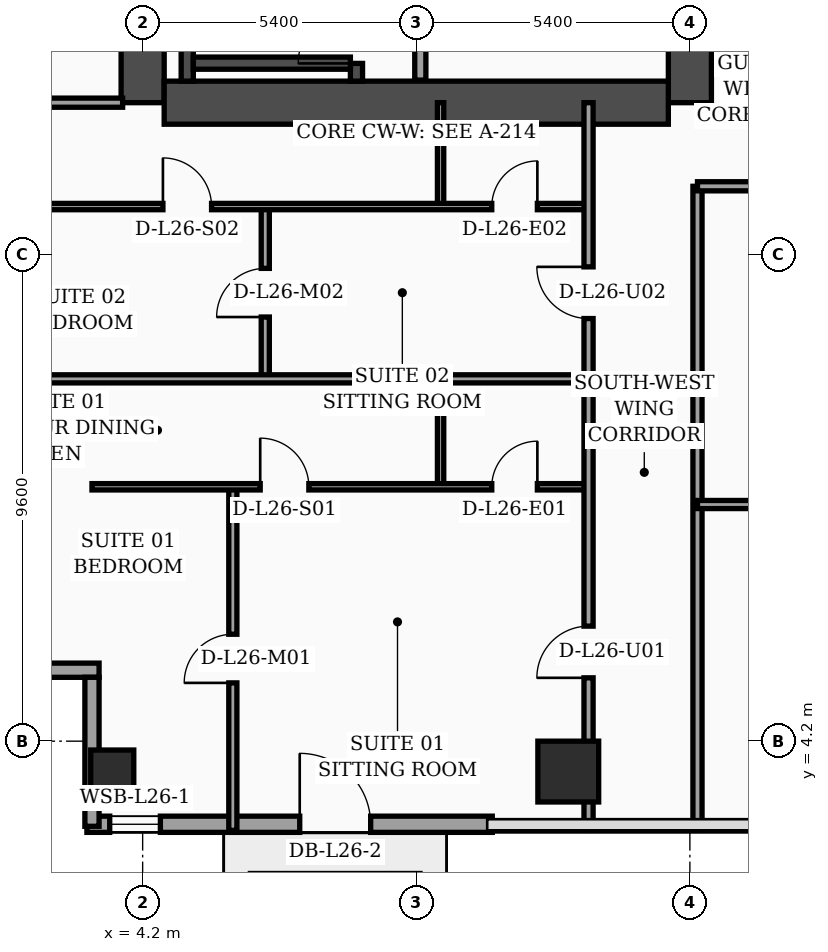
"""IFC4 building model, lengths in metres.
Left out: names, types, materials, properties, quantities, classifications, styles, units other than length and angle.
Written with IfcOpenShell. Run it as: python <this file> out.ifc"""

import sys

from ifc_helpers import new_model, si_unit, direction, frame, frame_2d, origin, origin_2d, place, context, subcontext, project, spatial, rectangle, hollow_rectangle, extrude, element, fill, save


model = new_model("IFC4")
c1 = context("Model", 3, precision=1e-05, world=origin(), true_north=direction((0.0, 1.0)))
c2 = subcontext(c1, "Body", "Model", "MODEL_VIEW")
j1 = project(units=[si_unit("LENGTHUNIT", "METRE"), si_unit("PLANEANGLEUNIT", "RADIAN")], contexts=[c1])
p1 = place(None, origin())
s1 = spatial("IfcSite", under=j1, at=p1, CompositionType="ELEMENT")
p2 = place(p1, origin())
s2 = spatial("IfcBuilding", under=s1, at=p2, CompositionType="ELEMENT")
p3 = place(p2, frame((0.0, 0.0, 108.8)))
s3 = spatial("IfcBuildingStorey", under=s2, at=p3, CompositionType="ELEMENT", Elevation=108.8)
p4 = place(p3, frame((4.2, 16.8, 0.0), z_axis=(0.0, 0.0, 1.0), x_axis=(0.0, 1.0, 0.0)))
e1 = element("IfcWall", 1, at=p4, inside=s3, PredefinedType="SHEAR", context=c2, shape_type="SweptSolid", body=[
    extrude(rectangle(XDim=21.6, YDim=0.85, at=frame_2d((10.8, 0.0))), origin(), (0.0, 0.0, 1.0), 3.56),
])
p5 = place(p3, frame((15.0, 16.8, 0.0), z_axis=(0.0, 0.0, 1.0), x_axis=(0.0, 1.0, 0.0)))
e2 = element("IfcWall", 2, at=p5, inside=s3, PredefinedType="SHEAR", context=c2, shape_type="SweptSolid", body=[
    extrude(rectangle(XDim=21.6, YDim=0.85, at=frame_2d((10.8, 0.0))), origin(), (0.0, 0.0, 1.0), 3.56),
])
p6 = place(p5, frame((8.65, 0.0, 0.0)))
e3 = element("IfcOpeningElement", 3, at=p6, cuts=e2, PredefinedType="OPENING", context=c2, shape_type="SweptSolid", body=[
    extrude(rectangle(XDim=1.1, YDim=2.2, at=frame_2d((0.55, 1.1))), frame((0.0, 0.435, 0.0), z_axis=(0.0, -1.0, 0.0), x_axis=(1.0, 0.0, 0.0)), (0.0, 0.0, 1.0), 0.87),
])
p7 = place(p5, frame((10.85, 0.0, 0.0)))
e4 = element("IfcOpeningElement", 4, at=p7, cuts=e2, PredefinedType="OPENING", context=c2, shape_type="SweptSolid", body=[
    extrude(rectangle(XDim=1.1, YDim=2.2, at=frame_2d((0.55, 1.1))), frame((0.0, 0.435, 0.0), z_axis=(0.0, -1.0, 0.0), x_axis=(1.0, 0.0, 0.0)), (0.0, 0.0, 1.0), 0.87),
])
p8 = place(p5, frame((13.5, 0.0, 0.0)))
e5 = element("IfcOpeningElement", 5, at=p8, cuts=e2, PredefinedType="OPENING", context=c2, shape_type="SweptSolid", body=[
    extrude(rectangle(XDim=1.1, YDim=2.2, at=frame_2d((0.55, 1.1))), frame((0.0, 0.435, 0.0), z_axis=(0.0, -1.0, 0.0), x_axis=(1.0, 0.0, 0.0)), (0.0, 0.0, 1.0), 0.87),
])
p9 = place(p5, frame((16.15, 0.0, 0.0)))
e6 = element("IfcOpeningElement", 6, at=p9, cuts=e2, PredefinedType="OPENING", context=c2, shape_type="SweptSolid", body=[
    extrude(rectangle(XDim=1.1, YDim=2.2, at=frame_2d((0.55, 1.1))), frame((0.0, 0.435, 0.0), z_axis=(0.0, -1.0, 0.0), x_axis=(1.0, 0.0, 0.0)), (0.0, 0.0, 1.0), 0.87),
])
p10 = place(p3, frame((4.625, 16.8, 0.0), z_axis=(0.0, 0.0, 1.0), x_axis=(1.0, 0.0, 0.0)))
e7 = element("IfcWall", 7, at=p10, inside=s3, PredefinedType="SHEAR", context=c2, shape_type="SweptSolid", body=[
    extrude(rectangle(XDim=9.95, YDim=0.85, at=frame_2d((4.975, 0.0))), origin(), (0.0, 0.0, 1.0), 3.56),
])
p11 = place(p3, frame((5.08, 17.225, 0.0), z_axis=(0.0, 0.0, 1.0), x_axis=(0.0, 1.0, 0.0)))
e8 = element("IfcWall", 8, at=p11, inside=s3, PredefinedType="SOLIDWALL", context=c2, shape_type="SweptSolid", body=[
    extrude(rectangle(XDim=9.565, YDim=0.24, at=frame_2d((4.782, 0.0))), origin(), (0.0, 0.0, 1.0), 3.56),
])
p12 = place(p3, frame((8.42, 17.225, 0.0), z_axis=(0.0, 0.0, 1.0), x_axis=(0.0, 1.0, 0.0)))
e9 = element("IfcWall", 9, at=p12, inside=s3, PredefinedType="SOLIDWALL", context=c2, shape_type="SweptSolid", body=[
    extrude(rectangle(XDim=9.565, YDim=0.24, at=frame_2d((4.782, 0.0))), origin(), (0.0, 0.0, 1.0), 3.56),
])
p13 = place(p12, frame((0.35, 0.0, 0.0)))
e10 = element("IfcOpeningElement", 10, at=p13, cuts=e9, PredefinedType="OPENING", context=c2, shape_type="SweptSolid", body=[
    extrude(rectangle(XDim=1.15, YDim=2.2, at=frame_2d((0.575, 1.1))), frame((0.0, 0.13, 0.0), z_axis=(0.0, -1.0, 0.0), x_axis=(1.0, 0.0, 0.0)), (0.0, 0.0, 1.0), 0.26),
])
p14 = place(p3, frame((5.2, 17.58, 0.0), z_axis=(0.0, 0.0, 1.0), x_axis=(1.0, 0.0, 0.0)))
e11 = element("IfcWall", 11, at=p14, inside=s3, PredefinedType="SOLIDWALL", context=c2, shape_type="SweptSolid", body=[
    extrude(rectangle(XDim=3.1, YDim=0.24, at=frame_2d((1.55, 0.0))), origin(), (0.0, 0.0, 1.0), 3.56),
])
p15 = place(p3, frame((3.6, 3.6, 0.0), z_axis=(0.0, 0.0, 1.0), x_axis=(1.0, 0.0, 0.0)))
e12 = element("IfcColumn", 12, at=p15, inside=s3, PredefinedType="COLUMN", context=c2, shape_type="SweptSolid", body=[
    extrude(hollow_rectangle(XDim=0.85, YDim=0.85, WallThickness=0.036, at=origin_2d()), origin(), (0.0, 0.0, 1.0), 3.56),
])
p16 = place(p3, frame((12.6, 3.6, 0.0), z_axis=(0.0, 0.0, 1.0), x_axis=(1.0, 0.0, 0.0)))
e13 = element("IfcColumn", 13, at=p16, inside=s3, PredefinedType="COLUMN", context=c2, shape_type="SweptSolid", body=[
    extrude(rectangle(XDim=1.2, YDim=1.2, at=origin_2d()), origin(), (0.0, 0.0, 1.0), 3.56),
])
p17 = place(p3, frame((3.1, 2.56, 0.0), z_axis=(0.0, 0.0, 1.0), x_axis=(1.0, 0.0, 0.0)))
e14 = element("IfcWall", 14, at=p17, inside=s3, PredefinedType="SOLIDWALL", context=c2, shape_type="SweptSolid", body=[
    extrude(rectangle(XDim=8.0, YDim=0.32, at=frame_2d((4.0, 0.0))), origin(), (0.0, 0.0, 1.0), 3.56),
])
p18 = place(p17, frame((0.45, 0.0, 0.75)))
e15 = element("IfcOpeningElement", 15, at=p18, cuts=e14, PredefinedType="OPENING", context=c2, shape_type="SweptSolid", body=[
    extrude(rectangle(XDim=1.0, YDim=1.6, at=frame_2d((0.5, 0.8))), frame((0.0, 0.17, 0.0), z_axis=(0.0, -1.0, 0.0), x_axis=(1.0, 0.0, 0.0)), (0.0, 0.0, 1.0), 0.34),
])
p19 = place(p17, frame((4.2, 0.0, 0.0)))
e16 = element("IfcOpeningElement", 16, at=p19, cuts=e14, PredefinedType="OPENING", context=c2, shape_type="SweptSolid", body=[
    extrude(rectangle(XDim=1.4, YDim=2.25, at=frame_2d((0.7, 1.125))), frame((0.0, 0.17, 0.0), z_axis=(0.0, -1.0, 0.0), x_axis=(1.0, 0.0, 0.0)), (0.0, 0.0, 1.0), 0.34),
])
p20 = place(p3, frame((0.12, 5.6, 0.0), z_axis=(0.0, 0.0, 1.0), x_axis=(1.0, 0.0, 0.0)))
e17 = element("IfcWall", 17, at=p20, inside=s3, PredefinedType="SOLIDWALL", context=c2, shape_type="SweptSolid", body=[
    extrude(rectangle(XDim=3.22, YDim=0.28, at=frame_2d((1.61, 0.0))), origin(), (0.0, 0.0, 1.0), 2.84),
])
p21 = place(p3, frame((3.2, 5.46, 0.0), z_axis=(0.0, 0.0, 1.0), x_axis=(0.0, -1.0, 0.0)))
e18 = element("IfcWall", 18, at=p21, inside=s3, PredefinedType="SOLIDWALL", context=c2, shape_type="SweptSolid", body=[
    extrude(rectangle(XDim=2.94, YDim=0.28, at=frame_2d((1.47, 0.0))), origin(), (0.0, 0.0, 1.0), 2.84),
])
p22 = place(p3, frame((9.68, 17.245, 0.0), z_axis=(0.0, 0.0, 1.0), x_axis=(0.0, 1.0, 0.0)))
e19 = element("IfcWall", 19, at=p22, inside=s3, PredefinedType="SOLIDWALL", context=c2, shape_type="SweptSolid", body=[
    extrude(rectangle(XDim=7.755, YDim=0.22, at=frame_2d((3.877, 0.0))), origin(), (0.0, 0.0, 1.0), 3.56),
])
p23 = place(p3, frame((0.08, 16.8, 0.0), z_axis=(0.0, 0.0, 1.0), x_axis=(1.0, 0.0, 0.0)))
e20 = element("IfcWall", 20, at=p23, inside=s3, PredefinedType="PARTITIONING", context=c2, shape_type="SweptSolid", body=[
    extrude(rectangle(XDim=3.725, YDim=0.18, at=frame_2d((1.862, 0.0))), origin(), (0.0, 0.0, 1.0), 2.84),
])
p24 = place(p3, frame((10.08, 9.22, 0.0), z_axis=(0.0, 0.0, 1.0), x_axis=(0.0, 1.0, 0.0)))
e21 = element("IfcWall", 21, at=p24, inside=s3, PredefinedType="PARTITIONING", context=c2, shape_type="SweptSolid", body=[
    extrude(rectangle(XDim=2.13, YDim=0.125, at=frame_2d((1.065, 0.0))), origin(), (0.0, 0.0, 1.0), 3.09),
])
p25 = place(p3, frame((5.98, 2.44, 0.0), z_axis=(0.0, 0.0, 1.0), x_axis=(0.0, 1.0, 0.0)))
e22 = element("IfcWall", 22, at=p25, inside=s3, PredefinedType="PARTITIONING", context=c2, shape_type="SweptSolid", body=[
    extrude(rectangle(XDim=6.78, YDim=0.16, at=frame_2d((3.39, 0.0))), origin(), (0.0, 0.0, 1.0), 3.04),
])
p26 = place(p25, frame((2.91, 0.0, 0.0)))
e23 = element("IfcOpeningElement", 23, at=p26, cuts=e22, PredefinedType="OPENING", context=c2, shape_type="SweptSolid", body=[
    extrude(rectangle(XDim=0.96, YDim=2.2, at=frame_2d((0.48, 1.1))), frame((0.0, 0.09, 0.0), z_axis=(0.0, -1.0, 0.0), x_axis=(1.0, 0.0, 0.0)), (0.0, 0.0, 1.0), 0.18),
])
p27 = place(p3, frame((3.2, 9.22, 0.0), z_axis=(0.0, 0.0, 1.0), x_axis=(1.0, 0.0, 0.0)))
e24 = element("IfcWall", 24, at=p27, inside=s3, PredefinedType="PARTITIONING", context=c2, shape_type="SweptSolid", body=[
    extrude(rectangle(XDim=9.8, YDim=0.125, at=frame_2d((4.9, 0.0))), origin(), (0.0, 0.0, 1.0), 2.84),
])
p28 = place(p27, frame((3.32, 0.0, 0.0)))
e25 = element("IfcOpeningElement", 25, at=p28, cuts=e24, PredefinedType="OPENING", context=c2, shape_type="SweptSolid", body=[
    extrude(rectangle(XDim=0.96, YDim=2.2, at=frame_2d((0.48, 1.1))), frame((0.0, 0.073, 0.0), z_axis=(0.0, -1.0, 0.0), x_axis=(1.0, 0.0, 0.0)), (0.0, 0.0, 1.0), 0.145),
])
p29 = place(p27, frame((7.89, 0.0, 0.0)))
e26 = element("IfcOpeningElement", 26, at=p29, cuts=e24, PredefinedType="OPENING", context=c2, shape_type="SweptSolid", body=[
    extrude(rectangle(XDim=0.9, YDim=2.15, at=frame_2d((0.45, 1.075))), frame((0.0, 0.073, 0.0), z_axis=(0.0, -1.0, 0.0), x_axis=(1.0, 0.0, 0.0)), (0.0, 0.0, 1.0), 0.145),
])
p30 = place(p3, frame((10.08, 14.75, 0.0), z_axis=(0.0, 0.0, 1.0), x_axis=(0.0, 1.0, 0.0)))
e27 = element("IfcWall", 27, at=p30, inside=s3, PredefinedType="PARTITIONING", context=c2, shape_type="SweptSolid", body=[
    extrude(rectangle(XDim=2.05, YDim=0.125, at=frame_2d((1.025, 0.0))), origin(), (0.0, 0.0, 1.0), 3.56),
])
p31 = place(p3, frame((6.62, 11.35, 0.0), z_axis=(0.0, 0.0, 1.0), x_axis=(0.0, 1.0, 0.0)))
e28 = element("IfcWall", 28, at=p31, inside=s3, PredefinedType="PARTITIONING", context=c2, shape_type="SweptSolid", body=[
    extrude(rectangle(XDim=3.4, YDim=0.16, at=frame_2d((1.7, 0.0))), origin(), (0.0, 0.0, 1.0), 3.56),
])
p32 = place(p31, frame((1.22, 0.0, 0.0)))
e29 = element("IfcOpeningElement", 29, at=p32, cuts=e28, PredefinedType="OPENING", context=c2, shape_type="SweptSolid", body=[
    extrude(rectangle(XDim=0.96, YDim=2.2, at=frame_2d((0.48, 1.1))), frame((0.0, 0.09, 0.0), z_axis=(0.0, -1.0, 0.0), x_axis=(1.0, 0.0, 0.0)), (0.0, 0.0, 1.0), 0.18),
])
p33 = place(p3, frame((0.08, 14.75, 0.0), z_axis=(0.0, 0.0, 1.0), x_axis=(1.0, 0.0, 0.0)))
e30 = element("IfcWall", 30, at=p33, inside=s3, PredefinedType="PARTITIONING", context=c2, shape_type="SweptSolid", body=[
    extrude(rectangle(XDim=12.92, YDim=0.125, at=frame_2d((6.46, 0.0))), origin(), (0.0, 0.0, 1.0), 2.84),
])
p34 = place(p33, frame((4.52, 0.0, 0.0)))
e31 = element("IfcOpeningElement", 31, at=p34, cuts=e30, PredefinedType="OPENING", context=c2, shape_type="SweptSolid", body=[
    extrude(rectangle(XDim=0.96, YDim=2.2, at=frame_2d((0.48, 1.1))), frame((0.0, 0.073, 0.0), z_axis=(0.0, -1.0, 0.0), x_axis=(1.0, 0.0, 0.0)), (0.0, 0.0, 1.0), 0.145),
])
p35 = place(p33, frame((11.01, 0.0, 0.0)))
e32 = element("IfcOpeningElement", 32, at=p35, cuts=e30, PredefinedType="OPENING", context=c2, shape_type="SweptSolid", body=[
    extrude(rectangle(XDim=0.9, YDim=2.15, at=frame_2d((0.45, 1.075))), frame((0.0, 0.073, 0.0), z_axis=(0.0, -1.0, 0.0), x_axis=(1.0, 0.0, 0.0)), (0.0, 0.0, 1.0), 0.145),
])
p36 = place(p3, frame((0.08, 11.35, 0.0), z_axis=(0.0, 0.0, 1.0), x_axis=(1.0, 0.0, 0.0)))
e33 = element("IfcWall", 33, at=p36, inside=s3, PredefinedType="PARTITIONING", context=c2, shape_type="SweptSolid", body=[
    extrude(rectangle(XDim=12.92, YDim=0.16, at=frame_2d((6.46, 0.0))), origin(), (0.0, 0.0, 1.0), 2.84),
])
p37 = place(p3, frame((13.0, 2.44, 0.0), z_axis=(0.0, 0.0, 1.0), x_axis=(0.0, 1.0, 0.0)))
e34 = element("IfcWall", 34, at=p37, inside=s3, PredefinedType="PARTITIONING", context=c2, shape_type="SweptSolid", body=[
    extrude(rectangle(XDim=14.36, YDim=0.18, at=frame_2d((7.18, 0.0))), origin(), (0.0, 0.0, 1.0), 2.84),
])
p38 = place(p37, frame((3.01, 0.0, 0.0)))
e35 = element("IfcOpeningElement", 35, at=p38, cuts=e34, PredefinedType="OPENING", context=c2, shape_type="SweptSolid", body=[
    extrude(rectangle(XDim=1.02, YDim=2.2, at=frame_2d((0.51, 1.1))), frame((0.0, 0.1, 0.0), z_axis=(0.0, -1.0, 0.0), x_axis=(1.0, 0.0, 0.0)), (0.0, 0.0, 1.0), 0.2),
])
p39 = place(p37, frame((10.1, 0.0, 0.0)))
e36 = element("IfcOpeningElement", 36, at=p39, cuts=e34, PredefinedType="OPENING", context=c2, shape_type="SweptSolid", body=[
    extrude(rectangle(XDim=1.02, YDim=2.2, at=frame_2d((0.51, 1.1))), frame((0.0, 0.1, 0.0), z_axis=(0.0, -1.0, 0.0), x_axis=(1.0, 0.0, 0.0)), (0.0, 0.0, 1.0), 0.2),
])
p40 = place(p3, frame((15.15, 2.44, 0.0), z_axis=(0.0, 0.0, 1.0), x_axis=(0.0, 1.0, 0.0)))
e37 = element("IfcWall", 37, at=p40, inside=s3, PredefinedType="PARTITIONING", context=c2, shape_type="SweptSolid", body=[
    extrude(rectangle(XDim=12.71, YDim=0.18, at=frame_2d((6.355, 0.0))), origin(), (0.0, 0.0, 1.0), 3.04),
])
p41 = place(p3, frame((15.15, 8.87, 0.0), z_axis=(0.0, 0.0, 1.0), x_axis=(1.0, 0.0, 0.0)))
e38 = element("IfcWall", 38, at=p41, inside=s3, PredefinedType="PARTITIONING", context=c2, shape_type="SweptSolid", body=[
    extrude(rectangle(XDim=4.45, YDim=0.16, at=frame_2d((2.225, 0.0))), origin(), (0.0, 0.0, 1.0), 3.56),
])
p42 = place(p41, frame((1.75, 0.0, 0.0)))
e39 = element("IfcOpeningElement", 39, at=p42, cuts=e38, PredefinedType="OPENING", context=c2, shape_type="SweptSolid", body=[
    extrude(rectangle(XDim=0.96, YDim=2.2, at=frame_2d((0.48, 1.1))), frame((0.0, 0.09, 0.0), z_axis=(0.0, -1.0, 0.0), x_axis=(1.0, 0.0, 0.0)), (0.0, 0.0, 1.0), 0.18),
])
p43 = place(p3, frame((15.15, 15.15, 0.0), z_axis=(0.0, 0.0, 1.0), x_axis=(1.0, 0.0, 0.0)))
e40 = element("IfcWall", 40, at=p43, inside=s3, PredefinedType="PARTITIONING", context=c2, shape_type="SweptSolid", body=[
    extrude(rectangle(XDim=6.45, YDim=0.18, at=frame_2d((3.225, 0.0))), origin(), (0.0, 0.0, 1.0), 2.49),
])
p44 = place(p43, frame((1.74, 0.0, 0.0)))
e41 = element("IfcOpeningElement", 41, at=p44, cuts=e40, PredefinedType="OPENING", context=c2, shape_type="SweptSolid", body=[
    extrude(rectangle(XDim=1.02, YDim=2.2, at=frame_2d((0.51, 1.1))), frame((0.0, 0.1, 0.0), z_axis=(0.0, -1.0, 0.0), x_axis=(1.0, 0.0, 0.0)), (0.0, 0.0, 1.0), 0.2),
])
p45 = place(p18, origin())
e42 = element("IfcWindow", 42, at=p45, inside=s3, PartitioningType="SINGLE_PANEL", PredefinedType="WINDOW", context=c2, shape_type="SweptSolid", body=[
    extrude(rectangle(XDim=1.0, YDim=1.6, at=frame_2d((0.5, 0.8))), frame((0.0, 0.03, 0.0), z_axis=(0.0, -1.0, 0.0), x_axis=(1.0, 0.0, 0.0)), (0.0, 0.0, 1.0), 0.06),
])
fill(e15, e42)
p46 = place(p19, origin())
e43 = element("IfcDoor", 43, at=p46, inside=s3, OperationType="SINGLE_SWING_LEFT", PredefinedType="DOOR", context=c2, shape_type="SweptSolid", body=[
    extrude(rectangle(XDim=1.4, YDim=2.25, at=frame_2d((0.7, 1.125))), frame((0.0, 0.025, 0.0), z_axis=(0.0, -1.0, 0.0), x_axis=(1.0, 0.0, 0.0)), (0.0, 0.0, 1.0), 0.05),
])
fill(e16, e43)
p47 = place(p26, origin())
e44 = element("IfcDoor", 44, at=p47, inside=s3, OperationType="SINGLE_SWING_LEFT", PredefinedType="DOOR", context=c2, shape_type="SweptSolid", body=[
    extrude(rectangle(XDim=0.96, YDim=2.2, at=frame_2d((0.48, 1.1))), frame((0.0, 0.025, 0.0), z_axis=(0.0, -1.0, 0.0), x_axis=(1.0, 0.0, 0.0)), (0.0, 0.0, 1.0), 0.05),
])
fill(e23, e44)
p48 = place(p28, origin())
e45 = element("IfcDoor", 45, at=p48, inside=s3, OperationType="SINGLE_SWING_LEFT", PredefinedType="DOOR", context=c2, shape_type="SweptSolid", body=[
    extrude(rectangle(XDim=0.96, YDim=2.2, at=frame_2d((0.48, 1.1))), frame((0.0, 0.025, 0.0), z_axis=(0.0, -1.0, 0.0), x_axis=(1.0, 0.0, 0.0)), (0.0, 0.0, 1.0), 0.05),
])
fill(e25, e45)
p49 = place(p29, origin())
e46 = element("IfcDoor", 46, at=p49, inside=s3, OperationType="SINGLE_SWING_RIGHT", PredefinedType="DOOR", context=c2, shape_type="SweptSolid", body=[
    extrude(rectangle(XDim=0.9, YDim=2.15, at=frame_2d((0.45, 1.075))), frame((0.0, 0.025, 0.0), z_axis=(0.0, -1.0, 0.0), x_axis=(1.0, 0.0, 0.0)), (0.0, 0.0, 1.0), 0.05),
])
fill(e26, e46)
p50 = place(p32, origin())
e47 = element("IfcDoor", 47, at=p50, inside=s3, OperationType="SINGLE_SWING_LEFT", PredefinedType="DOOR", context=c2, shape_type="SweptSolid", body=[
    extrude(rectangle(XDim=0.96, YDim=2.2, at=frame_2d((0.48, 1.1))), frame((0.0, 0.025, 0.0), z_axis=(0.0, -1.0, 0.0), x_axis=(1.0, 0.0, 0.0)), (0.0, 0.0, 1.0), 0.05),
])
fill(e29, e47)
p51 = place(p34, origin())
e48 = element("IfcDoor", 48, at=p51, inside=s3, OperationType="SINGLE_SWING_LEFT", PredefinedType="DOOR", context=c2, shape_type="SweptSolid", body=[
    extrude(rectangle(XDim=0.96, YDim=2.2, at=frame_2d((0.48, 1.1))), frame((0.0, 0.025, 0.0), z_axis=(0.0, -1.0, 0.0), x_axis=(1.0, 0.0, 0.0)), (0.0, 0.0, 1.0), 0.05),
])
fill(e31, e48)
p52 = place(p35, origin())
e49 = element("IfcDoor", 49, at=p52, inside=s3, OperationType="SINGLE_SWING_RIGHT", PredefinedType="DOOR", context=c2, shape_type="SweptSolid", body=[
    extrude(rectangle(XDim=0.9, YDim=2.15, at=frame_2d((0.45, 1.075))), frame((0.0, 0.025, 0.0), z_axis=(0.0, -1.0, 0.0), x_axis=(1.0, 0.0, 0.0)), (0.0, 0.0, 1.0), 0.05),
])
fill(e32, e49)
p53 = place(p38, origin())
e50 = element("IfcDoor", 50, at=p53, inside=s3, OperationType="SINGLE_SWING_LEFT", PredefinedType="DOOR", context=c2, shape_type="SweptSolid", body=[
    extrude(rectangle(XDim=1.02, YDim=2.2, at=frame_2d((0.51, 1.1))), frame((0.0, 0.025, 0.0), z_axis=(0.0, -1.0, 0.0), x_axis=(1.0, 0.0, 0.0)), (0.0, 0.0, 1.0), 0.05),
])
fill(e35, e50)
p54 = place(p39, origin())
e51 = element("IfcDoor", 51, at=p54, inside=s3, OperationType="SINGLE_SWING_RIGHT", PredefinedType="DOOR", context=c2, shape_type="SweptSolid", body=[
    extrude(rectangle(XDim=1.02, YDim=2.2, at=frame_2d((0.51, 1.1))), frame((0.0, 0.025, 0.0), z_axis=(0.0, -1.0, 0.0), x_axis=(1.0, 0.0, 0.0)), (0.0, 0.0, 1.0), 0.05),
])
fill(e36, e51)
p55 = place(p13, origin())
e52 = element("IfcDoor", 52, at=p55, inside=s3, OperationType="SINGLE_SWING_LEFT", PredefinedType="DOOR", context=c2, shape_type="SweptSolid", body=[
    extrude(rectangle(XDim=1.15, YDim=2.2, at=frame_2d((0.575, 1.1))), frame((0.0, 0.025, 0.0), z_axis=(0.0, -1.0, 0.0), x_axis=(1.0, 0.0, 0.0)), (0.0, 0.0, 1.0), 0.05),
])
fill(e10, e52)
save(model, sys.argv[1])
